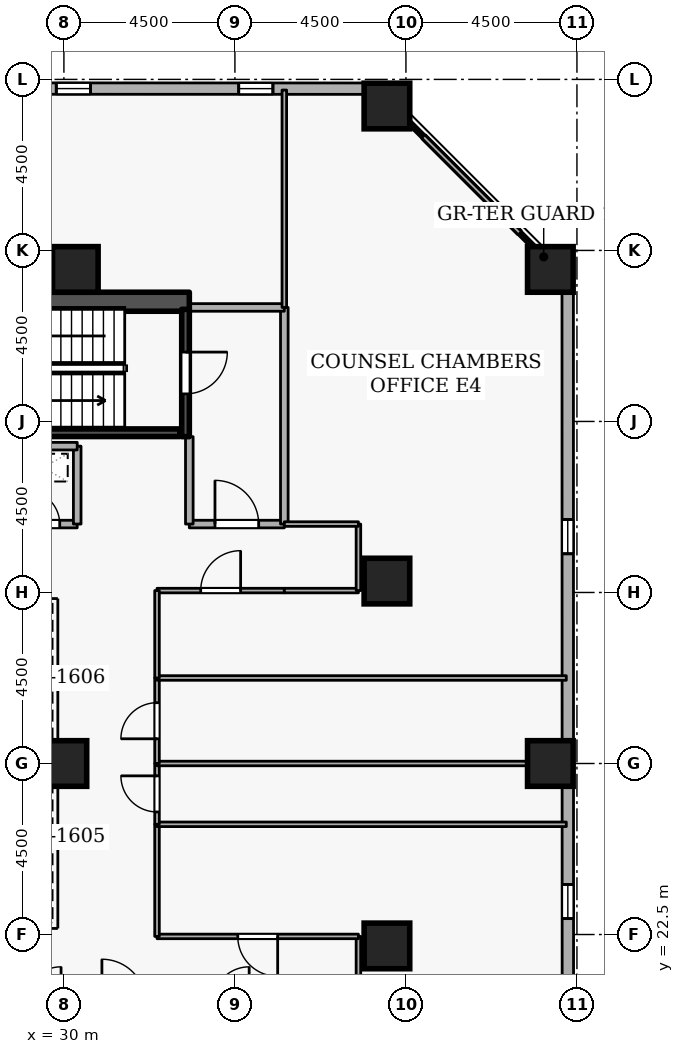
"""IFC4 building model, lengths in metres.
Left out: names, types, materials, properties, quantities, classifications, styles, units other than length and angle.
Written with IfcOpenShell. Run it as: python <this file> out.ifc"""

import sys

from ifc_helpers import new_model, si_unit, direction, frame, frame_2d, origin, origin_2d, place, context, subcontext, project, spatial, rectangle, extrude, element, fill, save


model = new_model("IFC4")
c1 = context("Model", 3, precision=1e-05, world=origin(), true_north=direction((0.0, 1.0)))
c2 = subcontext(c1, "Body", "Model", "MODEL_VIEW")
j1 = project(units=[si_unit("LENGTHUNIT", "METRE"), si_unit("PLANEANGLEUNIT", "RADIAN")], contexts=[c1])
p1 = place(None, origin())
s1 = spatial("IfcSite", under=j1, at=p1, CompositionType="ELEMENT")
p2 = place(p1, origin())
s2 = spatial("IfcBuilding", under=s1, at=p2, CompositionType="ELEMENT")
p3 = place(p2, frame((0.0, 0.0, 134.1)))
s3 = spatial("IfcBuildingStorey", under=s2, at=p3, CompositionType="ELEMENT", Elevation=134.1)
p4 = place(p3, frame((17.7, 39.15, 0.0), z_axis=(0.0, 0.0, 1.0), x_axis=(1.0, 0.0, 0.0)))
e1 = element("IfcWall", 1, at=p4, inside=s3, PredefinedType="SHEAR", context=c2, shape_type="SweptSolid", body=[
    extrude(rectangle(XDim=15.6, YDim=0.5, at=frame_2d((7.8, 0.0))), origin(), (0.0, 0.0, 1.0), 3.6),
])
for number, where, z_axis, x_axis in (
    (2, (42.8, 27.0, 0.0), (0.0, 0.0, 1.0), (1.0, 0.0, 0.0)),
    (3, (42.8, 40.0, 0.0), (0.0, 0.0, 1.0), (1.0, 0.0, 0.0)),
    (4, (38.5, 44.3, 0.0), (0.0, 0.0, 1.0), (1.0, 0.0, 0.0)),
    (5, (38.5, 22.2, 0.0), (0.0, 0.0, 1.0), (1.0, 0.0, 0.0)),
    (6, (38.5, 31.8, 0.0), (0.0, 0.0, 1.0), (1.0, 0.0, 0.0)),
    (7, (30.3, 40.0, 0.0), (0.0, 0.0, 1.0), (1.0, 0.0, 0.0)),
    (8, (30.0, 27.0, 0.0), (0.0, 0.0, 1.0), (1.0, 0.0, 0.0)),
):
    element("IfcColumn", number, at=place(p3, frame(where, z_axis=z_axis, x_axis=x_axis)), inside=s3, PredefinedType="COLUMN", context=c2, shape_type="SweptSolid", body=[
        extrude(rectangle(XDim=1.2, YDim=1.2, at=origin_2d()), origin(), (0.0, 0.0, 1.0), 3.6),
    ])
p5 = place(p3, frame((43.265, 5.819, 0.0), z_axis=(0.0, 0.0, 1.0), x_axis=(-0.000244999128, 0.999999969988, 0.0)))
e9 = element("IfcWall", 9, at=p5, inside=s3, PredefinedType="STANDARD", context=c2, shape_type="SweptSolid", body=[
    extrude(rectangle(XDim=33.881, YDim=0.3, at=frame_2d((16.94, 0.0))), origin(), (0.0, 0.0, 1.0), 2.7),
])
p6 = place(p5, frame((2.7, 0.0, 0.72)))
e10 = element("IfcOpeningElement", 10, at=p6, cuts=e9, PredefinedType="OPENING", context=c2, shape_type="SweptSolid", body=[
    extrude(rectangle(XDim=0.9, YDim=1.75, at=frame_2d((0.45, 0.875))), frame((0.0, 0.16, 0.0), z_axis=(0.0, -1.0, 0.0), x_axis=(1.0, 0.0, 0.0)), (0.0, 0.0, 1.0), 0.32),
])
p7 = place(p5, frame((12.3, 0.0, 0.72)))
e11 = element("IfcOpeningElement", 11, at=p7, cuts=e9, PredefinedType="OPENING", context=c2, shape_type="SweptSolid", body=[
    extrude(rectangle(XDim=0.9, YDim=1.75, at=frame_2d((0.45, 0.875))), frame((0.0, 0.16, 0.0), z_axis=(0.0, -1.0, 0.0), x_axis=(1.0, 0.0, 0.0)), (0.0, 0.0, 1.0), 0.32),
])
p8 = place(p5, frame((17.1, 0.0, 0.72)))
e12 = element("IfcOpeningElement", 12, at=p8, cuts=e9, PredefinedType="OPENING", context=c2, shape_type="SweptSolid", body=[
    extrude(rectangle(XDim=0.9, YDim=1.75, at=frame_2d((0.45, 0.875))), frame((0.0, 0.16, 0.0), z_axis=(0.0, -1.0, 0.0), x_axis=(1.0, 0.0, 0.0)), (0.0, 0.0, 1.0), 0.32),
])
p9 = place(p5, frame((26.7, 0.0, 0.72)))
e13 = element("IfcOpeningElement", 13, at=p9, cuts=e9, PredefinedType="OPENING", context=c2, shape_type="SweptSolid", body=[
    extrude(rectangle(XDim=0.9, YDim=1.75, at=frame_2d((0.45, 0.875))), frame((0.0, 0.16, 0.0), z_axis=(0.0, -1.0, 0.0), x_axis=(1.0, 0.0, 0.0)), (0.0, 0.0, 1.0), 0.32),
])
p10 = place(p3, frame((38.199, 44.756, 0.0), z_axis=(0.0, 0.0, 1.0), x_axis=(-0.999999969988, 0.000244999128, 0.0)))
e14 = element("IfcWall", 14, at=p10, inside=s3, PredefinedType="STANDARD", context=c2, shape_type="SweptSolid", body=[
    extrude(rectangle(XDim=33.881, YDim=0.3, at=frame_2d((16.94, 0.0))), origin(), (0.0, 0.0, 1.0), 2.7),
])
p11 = place(p10, frame((2.7, 0.0, 0.72)))
e15 = element("IfcOpeningElement", 15, at=p11, cuts=e14, PredefinedType="OPENING", context=c2, shape_type="SweptSolid", body=[
    extrude(rectangle(XDim=0.9, YDim=1.75, at=frame_2d((0.45, 0.875))), frame((0.0, 0.16, 0.0), z_axis=(0.0, -1.0, 0.0), x_axis=(1.0, 0.0, 0.0)), (0.0, 0.0, 1.0), 0.32),
])
p12 = place(p10, frame((7.5, 0.0, 0.72)))
e16 = element("IfcOpeningElement", 16, at=p12, cuts=e14, PredefinedType="OPENING", context=c2, shape_type="SweptSolid", body=[
    extrude(rectangle(XDim=0.9, YDim=1.75, at=frame_2d((0.45, 0.875))), frame((0.0, 0.16, 0.0), z_axis=(0.0, -1.0, 0.0), x_axis=(1.0, 0.0, 0.0)), (0.0, 0.0, 1.0), 0.32),
])
p13 = place(p10, frame((17.1, 0.0, 0.72)))
e17 = element("IfcOpeningElement", 17, at=p13, cuts=e14, PredefinedType="OPENING", context=c2, shape_type="SweptSolid", body=[
    extrude(rectangle(XDim=0.9, YDim=1.75, at=frame_2d((0.45, 0.875))), frame((0.0, 0.16, 0.0), z_axis=(0.0, -1.0, 0.0), x_axis=(1.0, 0.0, 0.0)), (0.0, 0.0, 1.0), 0.32),
])
p14 = place(p10, frame((21.9, 0.0, 0.72)))
e18 = element("IfcOpeningElement", 18, at=p14, cuts=e14, PredefinedType="OPENING", context=c2, shape_type="SweptSolid", body=[
    extrude(rectangle(XDim=0.9, YDim=1.75, at=frame_2d((0.45, 0.875))), frame((0.0, 0.16, 0.0), z_axis=(0.0, -1.0, 0.0), x_axis=(1.0, 0.0, 0.0)), (0.0, 0.0, 1.0), 0.32),
])
p15 = place(p3, frame((33.2, 38.95, 0.0), z_axis=(0.0, 0.0, 1.0), x_axis=(0.0, -1.0, 0.0)))
e19 = element("IfcWall", 19, at=p15, inside=s3, PredefinedType="SHEAR", context=c2, shape_type="SweptSolid", body=[
    extrude(rectangle(XDim=3.35, YDim=0.2, at=frame_2d((1.675, 0.0))), origin(), (0.0, 0.0, 1.0), 3.6),
])
p16 = place(p15, frame((1.125, 0.0, 0.0)))
e20 = element("IfcOpeningElement", 20, at=p16, cuts=e19, PredefinedType="OPENING", context=c2, shape_type="SweptSolid", body=[
    extrude(rectangle(XDim=1.1, YDim=2.1, at=frame_2d((0.55, 1.05))), frame((0.0, 0.11, 0.0), z_axis=(0.0, -1.0, 0.0), x_axis=(1.0, 0.0, 0.0)), (0.0, 0.0, 1.0), 0.22),
])
p17 = place(p3, frame((25.95, 35.703, 0.0), z_axis=(0.0, 0.0, 1.0), x_axis=(1.0, 0.0, 0.0)))
e21 = element("IfcWall", 21, at=p17, inside=s3, PredefinedType="SHEAR", context=c2, shape_type="SweptSolid", body=[
    extrude(rectangle(XDim=7.1, YDim=0.2, at=frame_2d((3.55, 0.0))), origin(), (0.0, 0.0, 1.0), 3.6),
])
p18 = place(p3, frame((33.3, 33.3, 0.0), z_axis=(0.0, 0.0, 1.0), x_axis=(1.0, 0.0, 0.0)))
e22 = element("IfcWall", 22, at=p18, inside=s3, PredefinedType="STANDARD", context=c2, shape_type="SweptSolid", body=[
    extrude(rectangle(XDim=2.5, YDim=0.2, at=frame_2d((1.25, 0.0))), origin(), (0.0, 0.0, 1.0), 3.34),
])
p19 = place(p18, frame((0.675, 0.0, 0.0)))
e23 = element("IfcOpeningElement", 23, at=p19, cuts=e22, PredefinedType="OPENING", context=c2, shape_type="SweptSolid", body=[
    extrude(rectangle(XDim=1.15, YDim=2.1, at=frame_2d((0.575, 1.05))), frame((0.0, 0.11, 0.0), z_axis=(0.0, -1.0, 0.0), x_axis=(1.0, 0.0, 0.0)), (0.0, 0.0, 1.0), 0.22),
])
p20 = place(p3, frame((35.8, 33.3, 0.0), z_axis=(0.0, 0.0, 1.0), x_axis=(0.0, 1.0, 0.0)))
e24 = element("IfcWall", 24, at=p20, inside=s3, PredefinedType="STANDARD", context=c2, shape_type="SweptSolid", body=[
    extrude(rectangle(XDim=5.7, YDim=0.2, at=frame_2d((2.85, 0.0))), origin(), (0.0, 0.0, 1.0), 3.34),
])
p21 = place(p3, frame((35.8, 39.0, 0.0), z_axis=(0.0, 0.0, 1.0), x_axis=(-1.0, 0.0, 0.0)))
e25 = element("IfcWall", 25, at=p21, inside=s3, PredefinedType="STANDARD", context=c2, shape_type="SweptSolid", body=[
    extrude(rectangle(XDim=2.5, YDim=0.2, at=frame_2d((1.25, 0.0))), origin(), (0.0, 0.0, 1.0), 3.34),
])
p22 = place(p3, frame((33.3, 35.6, 0.0), z_axis=(0.0, 0.0, 1.0), x_axis=(0.0, -1.0, 0.0)))
e26 = element("IfcWall", 26, at=p22, inside=s3, PredefinedType="STANDARD", context=c2, shape_type="SweptSolid", body=[
    extrude(rectangle(XDim=2.3, YDim=0.2, at=frame_2d((1.15, 0.0))), origin(), (0.0, 0.0, 1.0), 2.545),
])
p23 = place(p3, frame((28.55, 33.3, 0.0), z_axis=(0.0, 0.0, 1.0), x_axis=(1.0, 0.0, 0.0)))
e27 = element("IfcWall", 27, at=p23, inside=s3, PredefinedType="STANDARD", context=c2, shape_type="SweptSolid", body=[
    extrude(rectangle(XDim=1.8, YDim=0.2, at=frame_2d((0.9, 0.0))), origin(), (0.0, 0.0, 1.0), 3.34),
])
p24 = place(p23, frame((0.46, 0.0, 0.0)))
e28 = element("IfcOpeningElement", 28, at=p24, cuts=e27, PredefinedType="OPENING", context=c2, shape_type="SweptSolid", body=[
    extrude(rectangle(XDim=0.88, YDim=2.04, at=frame_2d((0.44, 1.02))), frame((0.0, 0.11, 0.0), z_axis=(0.0, -1.0, 0.0), x_axis=(1.0, 0.0, 0.0)), (0.0, 0.0, 1.0), 0.22),
])
p25 = place(p3, frame((30.35, 33.3, 0.0), z_axis=(0.0, 0.0, 1.0), x_axis=(0.0, 1.0, 0.0)))
e29 = element("IfcWall", 29, at=p25, inside=s3, PredefinedType="STANDARD", context=c2, shape_type="SweptSolid", body=[
    extrude(rectangle(XDim=2.05, YDim=0.2, at=frame_2d((1.025, 0.0))), origin(), (0.0, 0.0, 1.0), 3.34),
])
p26 = place(p3, frame((30.35, 35.35, 0.0), z_axis=(0.0, 0.0, 1.0), x_axis=(-1.0, 0.0, 0.0)))
e30 = element("IfcWall", 30, at=p26, inside=s3, PredefinedType="STANDARD", context=c2, shape_type="SweptSolid", body=[
    extrude(rectangle(XDim=1.8, YDim=0.2, at=frame_2d((0.9, 0.0))), origin(), (0.0, 0.0, 1.0), 3.34),
])
p27 = place(p3, frame((37.75, 20.7, 0.0), z_axis=(0.0, 0.0, 1.0), x_axis=(0.0, 1.0, 0.0)))
e31 = element("IfcWall", 31, at=p27, inside=s3, PredefinedType="PARTITIONING", context=c2, shape_type="SweptSolid", body=[
    extrude(rectangle(XDim=1.75, YDim=0.12, at=frame_2d((0.875, 0.0))), origin(), (0.0, 0.0, 1.0), 3.34),
])
p28 = place(p3, frame((37.75, 22.45, 0.0), z_axis=(0.0, 0.0, 1.0), x_axis=(-1.0, 0.0, 0.0)))
e32 = element("IfcWall", 32, at=p28, inside=s3, PredefinedType="PARTITIONING", context=c2, shape_type="SweptSolid", body=[
    extrude(rectangle(XDim=5.3, YDim=0.12, at=frame_2d((2.65, 0.0))), origin(), (0.0, 0.0, 1.0), 3.34),
])
p29 = place(p28, frame((2.125, 0.0, 0.0)))
e33 = element("IfcOpeningElement", 33, at=p29, cuts=e32, PredefinedType="OPENING", context=c2, shape_type="SweptSolid", body=[
    extrude(rectangle(XDim=1.05, YDim=2.1, at=frame_2d((0.525, 1.05))), frame((0.0, 0.07, 0.0), z_axis=(0.0, -1.0, 0.0), x_axis=(1.0, 0.0, 0.0)), (0.0, 0.0, 1.0), 0.14),
])
p30 = place(p3, frame((32.45, 22.45, 0.0), z_axis=(0.0, 0.0, 1.0), x_axis=(0.0, 1.0, 0.0)))
e34 = element("IfcWall", 34, at=p30, inside=s3, PredefinedType="PARTITIONING", context=c2, shape_type="SweptSolid", body=[
    extrude(rectangle(XDim=2.95, YDim=0.12, at=frame_2d((1.475, 0.0))), origin(), (0.0, 0.0, 1.0), 3.34),
])
p31 = place(p3, frame((32.45, 25.4, 0.0), z_axis=(0.0, 0.0, 1.0), x_axis=(1.0, 0.0, 0.0)))
e35 = element("IfcWall", 35, at=p31, inside=s3, PredefinedType="PARTITIONING", context=c2, shape_type="SweptSolid", body=[
    extrude(rectangle(XDim=10.77, YDim=0.12, at=frame_2d((5.385, 0.0))), origin(), (0.0, 0.0, 1.0), 3.34),
])
p32 = place(p3, frame((32.45, 25.4, 0.0), z_axis=(0.0, 0.0, 1.0), x_axis=(0.0, 1.0, 0.0)))
e36 = element("IfcWall", 36, at=p32, inside=s3, PredefinedType="PARTITIONING", context=c2, shape_type="SweptSolid", body=[
    extrude(rectangle(XDim=1.6, YDim=0.12, at=frame_2d((0.8, 0.0))), origin(), (0.0, 0.0, 1.0), 3.34),
])
p33 = place(p32, frame((0.325, 0.0, 0.0)))
e37 = element("IfcOpeningElement", 37, at=p33, cuts=e36, PredefinedType="OPENING", context=c2, shape_type="SweptSolid", body=[
    extrude(rectangle(XDim=0.95, YDim=2.1, at=frame_2d((0.475, 1.05))), frame((0.0, 0.07, 0.0), z_axis=(0.0, -1.0, 0.0), x_axis=(1.0, 0.0, 0.0)), (0.0, 0.0, 1.0), 0.14),
])
p34 = place(p3, frame((32.45, 27.0, 0.0), z_axis=(0.0, 0.0, 1.0), x_axis=(1.0, 0.0, 0.0)))
e38 = element("IfcWall", 38, at=p34, inside=s3, PredefinedType="PARTITIONING", context=c2, shape_type="SweptSolid", body=[
    extrude(rectangle(XDim=10.77, YDim=0.12, at=frame_2d((5.385, 0.0))), origin(), (0.0, 0.0, 1.0), 2.878),
])
p35 = place(p3, frame((32.45, 27.0, 0.0), z_axis=(0.0, 0.0, 1.0), x_axis=(0.0, 1.0, 0.0)))
e39 = element("IfcWall", 39, at=p35, inside=s3, PredefinedType="PARTITIONING", context=c2, shape_type="SweptSolid", body=[
    extrude(rectangle(XDim=2.25, YDim=0.12, at=frame_2d((1.125, 0.0))), origin(), (0.0, 0.0, 1.0), 3.34),
])
p36 = place(p35, frame((0.65, 0.0, 0.0)))
e40 = element("IfcOpeningElement", 40, at=p36, cuts=e39, PredefinedType="OPENING", context=c2, shape_type="SweptSolid", body=[
    extrude(rectangle(XDim=0.95, YDim=2.1, at=frame_2d((0.475, 1.05))), frame((0.0, 0.07, 0.0), z_axis=(0.0, -1.0, 0.0), x_axis=(1.0, 0.0, 0.0)), (0.0, 0.0, 1.0), 0.14),
])
p37 = place(p3, frame((32.45, 29.25, 0.0), z_axis=(0.0, 0.0, 1.0), x_axis=(1.0, 0.0, 0.0)))
e41 = element("IfcWall", 41, at=p37, inside=s3, PredefinedType="PARTITIONING", context=c2, shape_type="SweptSolid", body=[
    extrude(rectangle(XDim=10.77, YDim=0.12, at=frame_2d((5.385, 0.0))), origin(), (0.0, 0.0, 1.0), 3.34),
])
p38 = place(p3, frame((32.45, 31.55, 0.0), z_axis=(0.0, 0.0, 1.0), x_axis=(1.0, 0.0, 0.0)))
e42 = element("IfcWall", 42, at=p38, inside=s3, PredefinedType="PARTITIONING", context=c2, shape_type="SweptSolid", body=[
    extrude(rectangle(XDim=3.35, YDim=0.12, at=frame_2d((1.675, 0.0))), origin(), (0.0, 0.0, 1.0), 3.34),
])
p39 = place(p38, frame((1.15, 0.0, 0.0)))
e43 = element("IfcOpeningElement", 43, at=p39, cuts=e42, PredefinedType="OPENING", context=c2, shape_type="SweptSolid", body=[
    extrude(rectangle(XDim=1.05, YDim=2.1, at=frame_2d((0.525, 1.05))), frame((0.0, 0.07, 0.0), z_axis=(0.0, -1.0, 0.0), x_axis=(1.0, 0.0, 0.0)), (0.0, 0.0, 1.0), 0.14),
])
p40 = place(p3, frame((35.8, 31.55, 0.0), z_axis=(0.0, 0.0, 1.0), x_axis=(1.0, 0.0, 0.0)))
e44 = element("IfcWall", 44, at=p40, inside=s3, PredefinedType="PARTITIONING", context=c2, shape_type="SweptSolid", body=[
    extrude(rectangle(XDim=1.95, YDim=0.12, at=frame_2d((0.975, 0.0))), origin(), (0.0, 0.0, 1.0), 3.34),
])
p41 = place(p3, frame((37.75, 31.55, 0.0), z_axis=(0.0, 0.0, 1.0), x_axis=(0.0, 1.0, 0.0)))
e45 = element("IfcWall", 45, at=p41, inside=s3, PredefinedType="PARTITIONING", context=c2, shape_type="SweptSolid", body=[
    extrude(rectangle(XDim=1.75, YDim=0.12, at=frame_2d((0.875, 0.0))), origin(), (0.0, 0.0, 1.0), 3.34),
])
p42 = place(p3, frame((37.75, 33.3, 0.0), z_axis=(0.0, 0.0, 1.0), x_axis=(-1.0, 0.0, 0.0)))
e46 = element("IfcWall", 46, at=p42, inside=s3, PredefinedType="PARTITIONING", context=c2, shape_type="SweptSolid", body=[
    extrude(rectangle(XDim=1.95, YDim=0.12, at=frame_2d((0.975, 0.0))), origin(), (0.0, 0.0, 1.0), 3.34),
])
p43 = place(p3, frame((35.8, 39.0, 0.0), z_axis=(0.0, 0.0, 1.0), x_axis=(0.0, 1.0, 0.0)))
e47 = element("IfcWall", 47, at=p43, inside=s3, PredefinedType="PARTITIONING", context=c2, shape_type="SweptSolid", body=[
    extrude(rectangle(XDim=5.72, YDim=0.12, at=frame_2d((2.86, 0.0))), origin(), (0.0, 0.0, 1.0), 3.34),
])
p44 = place(p3, frame((38.233, 44.72, 0.0), z_axis=(0.0, 0.0, 1.0), x_axis=(0.707106781187, -0.707106781187, 0.0)))
e48 = element("IfcWall", 48, at=p44, inside=s3, PredefinedType="PARTITIONING", context=c2, shape_type="SweptSolid", body=[
    extrude(rectangle(XDim=7.052, YDim=0.12, at=frame_2d((3.526, 0.0))), origin(), (0.0, 0.0, 1.0), 3.34),
])
p45 = place(p3, frame((32.45, 29.25, 0.0), z_axis=(0.0, 0.0, 1.0), x_axis=(0.0, 1.0, 0.0)))
e49 = element("IfcWall", 49, at=p45, inside=s3, PredefinedType="PARTITIONING", context=c2, shape_type="SweptSolid", body=[
    extrude(rectangle(XDim=2.3, YDim=0.12, at=frame_2d((1.15, 0.0))), origin(), (0.0, 0.0, 1.0), 3.34),
])
p46 = place(p8, origin())
e50 = element("IfcWindow", 50, at=p46, inside=s3, PartitioningType="SINGLE_PANEL", PredefinedType="WINDOW", context=c2, shape_type="SweptSolid", body=[
    extrude(rectangle(XDim=0.9, YDim=1.75, at=frame_2d((0.45, 0.875))), frame((0.0, 0.03, 0.0), z_axis=(0.0, -1.0, 0.0), x_axis=(1.0, 0.0, 0.0)), (0.0, 0.0, 1.0), 0.06),
])
fill(e12, e50)
p47 = place(p9, origin())
e51 = element("IfcWindow", 51, at=p47, inside=s3, PartitioningType="SINGLE_PANEL", PredefinedType="WINDOW", context=c2, shape_type="SweptSolid", body=[
    extrude(rectangle(XDim=0.9, YDim=1.75, at=frame_2d((0.45, 0.875))), frame((0.0, 0.03, 0.0), z_axis=(0.0, -1.0, 0.0), x_axis=(1.0, 0.0, 0.0)), (0.0, 0.0, 1.0), 0.06),
])
fill(e13, e51)
p48 = place(p11, origin())
e52 = element("IfcWindow", 52, at=p48, inside=s3, PartitioningType="SINGLE_PANEL", PredefinedType="WINDOW", context=c2, shape_type="SweptSolid", body=[
    extrude(rectangle(XDim=0.9, YDim=1.75, at=frame_2d((0.45, 0.875))), frame((0.0, 0.03, 0.0), z_axis=(0.0, -1.0, 0.0), x_axis=(1.0, 0.0, 0.0)), (0.0, 0.0, 1.0), 0.06),
])
fill(e15, e52)
p49 = place(p12, origin())
e53 = element("IfcWindow", 53, at=p49, inside=s3, PartitioningType="SINGLE_PANEL", PredefinedType="WINDOW", context=c2, shape_type="SweptSolid", body=[
    extrude(rectangle(XDim=0.9, YDim=1.75, at=frame_2d((0.45, 0.875))), frame((0.0, 0.03, 0.0), z_axis=(0.0, -1.0, 0.0), x_axis=(1.0, 0.0, 0.0)), (0.0, 0.0, 1.0), 0.06),
])
fill(e16, e53)
p50 = place(p16, origin())
e54 = element("IfcDoor", 54, at=p50, inside=s3, OperationType="SINGLE_SWING_LEFT", PredefinedType="DOOR", context=c2, shape_type="SweptSolid", body=[
    extrude(rectangle(XDim=1.1, YDim=2.1, at=frame_2d((0.55, 1.05))), frame((0.0, 0.025, 0.0), z_axis=(0.0, -1.0, 0.0), x_axis=(1.0, 0.0, 0.0)), (0.0, 0.0, 1.0), 0.05),
])
fill(e20, e54)
p51 = place(p19, origin())
e55 = element("IfcDoor", 55, at=p51, inside=s3, OperationType="SINGLE_SWING_LEFT", PredefinedType="DOOR", context=c2, shape_type="SweptSolid", body=[
    extrude(rectangle(XDim=1.15, YDim=2.1, at=frame_2d((0.575, 1.05))), frame((0.0, 0.025, 0.0), z_axis=(0.0, -1.0, 0.0), x_axis=(1.0, 0.0, 0.0)), (0.0, 0.0, 1.0), 0.05),
])
fill(e23, e55)
p52 = place(p24, origin())
e56 = element("IfcDoor", 56, at=p52, inside=s3, OperationType="SINGLE_SWING_LEFT", PredefinedType="DOOR", context=c2, shape_type="SweptSolid", body=[
    extrude(rectangle(XDim=0.88, YDim=2.04, at=frame_2d((0.44, 1.02))), frame((0.0, 0.025, 0.0), z_axis=(0.0, -1.0, 0.0), x_axis=(1.0, 0.0, 0.0)), (0.0, 0.0, 1.0), 0.05),
])
fill(e28, e56)
p53 = place(p29, origin())
e57 = element("IfcDoor", 57, at=p53, inside=s3, OperationType="SINGLE_SWING_LEFT", PredefinedType="DOOR", context=c2, shape_type="SweptSolid", body=[
    extrude(rectangle(XDim=1.05, YDim=2.1, at=frame_2d((0.525, 1.05))), frame((0.0, 0.025, 0.0), z_axis=(0.0, -1.0, 0.0), x_axis=(1.0, 0.0, 0.0)), (0.0, 0.0, 1.0), 0.05),
])
fill(e33, e57)
p54 = place(p33, origin())
e58 = element("IfcDoor", 58, at=p54, inside=s3, OperationType="SINGLE_SWING_RIGHT", PredefinedType="DOOR", context=c2, shape_type="SweptSolid", body=[
    extrude(rectangle(XDim=0.95, YDim=2.1, at=frame_2d((0.475, 1.05))), frame((0.0, 0.025, 0.0), z_axis=(0.0, -1.0, 0.0), x_axis=(1.0, 0.0, 0.0)), (0.0, 0.0, 1.0), 0.05),
])
fill(e37, e58)
p55 = place(p36, origin())
e59 = element("IfcDoor", 59, at=p55, inside=s3, OperationType="SINGLE_SWING_LEFT", PredefinedType="DOOR", context=c2, shape_type="SweptSolid", body=[
    extrude(rectangle(XDim=0.95, YDim=2.1, at=frame_2d((0.475, 1.05))), frame((0.0, 0.025, 0.0), z_axis=(0.0, -1.0, 0.0), x_axis=(1.0, 0.0, 0.0)), (0.0, 0.0, 1.0), 0.05),
])
fill(e40, e59)
p56 = place(p39, origin())
e60 = element("IfcDoor", 60, at=p56, inside=s3, OperationType="SINGLE_SWING_RIGHT", PredefinedType="DOOR", context=c2, shape_type="SweptSolid", body=[
    extrude(rectangle(XDim=1.05, YDim=2.1, at=frame_2d((0.525, 1.05))), frame((0.0, 0.025, 0.0), z_axis=(0.0, -1.0, 0.0), x_axis=(1.0, 0.0, 0.0)), (0.0, 0.0, 1.0), 0.05),
])
fill(e43, e60)
save(model, sys.argv[1])
